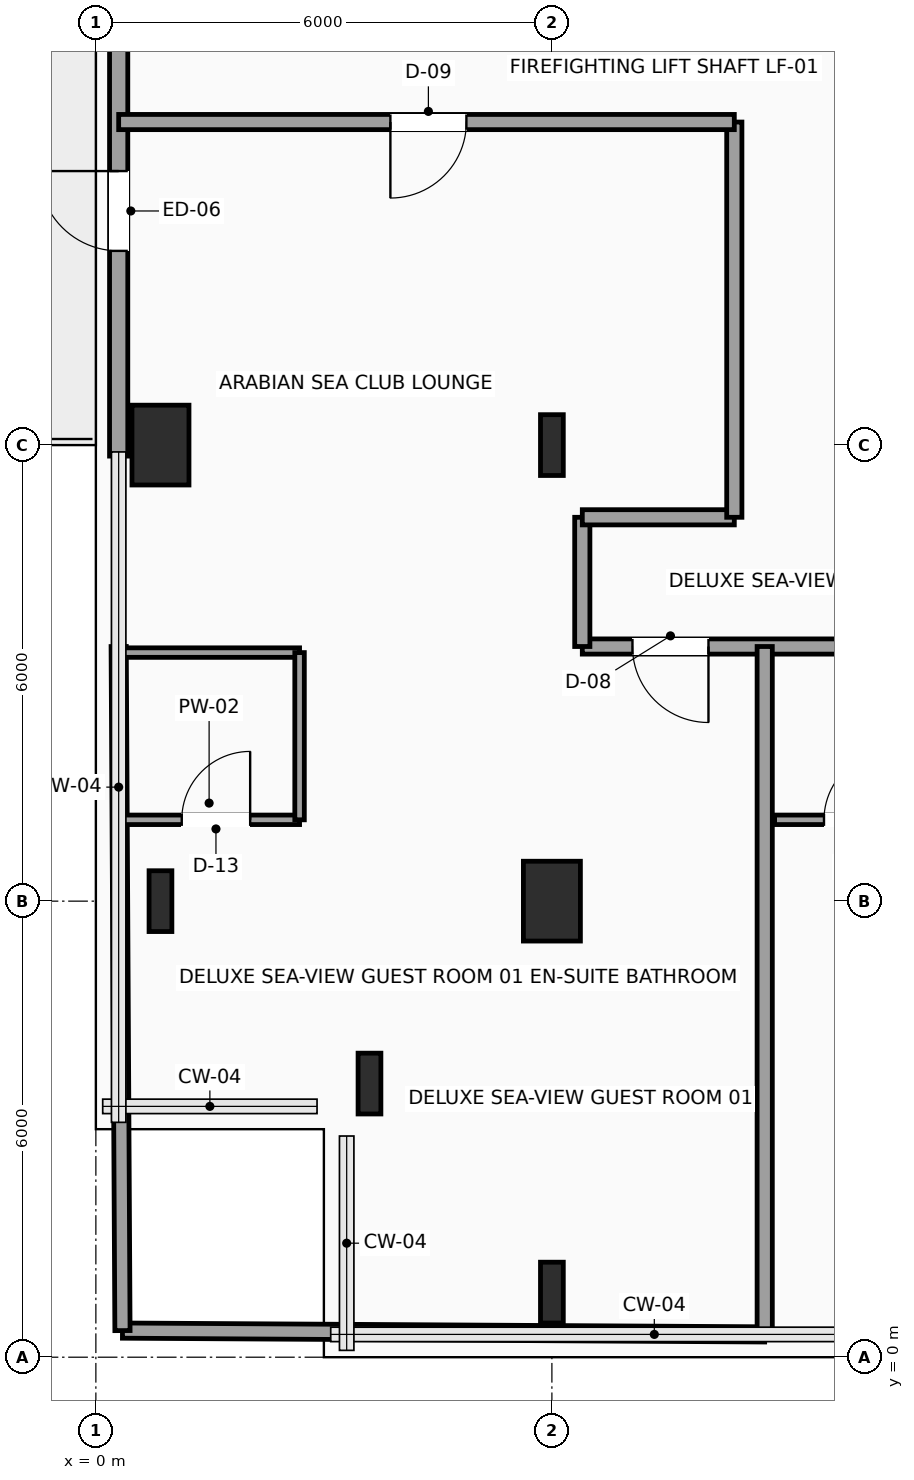
"""IFC4 building model, lengths in metres.
Left out: names, types, materials, properties, quantities, classifications, styles, units other than length and angle.
Written with IfcOpenShell. Run it as: python <this file> out.ifc"""

import sys

from ifc_helpers import new_model, si_unit, direction, frame, frame_2d, origin, origin_2d, place, context, subcontext, project, spatial, rectangle, i_section, extrude, element, fill, save


model = new_model("IFC4")
c1 = context("Model", 3, precision=1e-05, world=origin(), true_north=direction((0.0, 1.0)))
c2 = subcontext(c1, "Body", "Model", "MODEL_VIEW")
j1 = project(units=[si_unit("LENGTHUNIT", "METRE"), si_unit("PLANEANGLEUNIT", "RADIAN")], contexts=[c1])
p1 = place(None, origin())
s1 = spatial("IfcSite", under=j1, at=p1, CompositionType="ELEMENT")
p2 = place(p1, origin())
s2 = spatial("IfcBuilding", under=s1, at=p2, CompositionType="ELEMENT")
p3 = place(p2, frame((0.0, 0.0, 176.7)))
s3 = spatial("IfcBuildingStorey", under=s2, at=p3, CompositionType="ELEMENT", Elevation=176.7)
for number, where, z_axis, x_axis in (
    (1, (3.6, 3.6, 0.0), (0.0, 0.0, 1.0), (1.0, 0.0, 0.0)),
    (2, (0.85, 6.0, 0.0), (0.0, 0.0, 1.0), (1.0, 0.0, 0.0)),
):
    element("IfcColumn", number, at=place(p3, frame(where, z_axis=z_axis, x_axis=x_axis)), inside=s3, PredefinedType="COLUMN", context=c2, shape_type="SweptSolid", body=[
        extrude(i_section(OverallWidth=0.3, OverallDepth=0.8, WebThickness=0.018, FlangeThickness=0.033, FilletRadius=0.03, at=origin_2d()), origin(), (0.0, 0.0, 1.0), 3.75),
    ])
p4 = place(p3, frame((0.85, 12.0, 0.0), z_axis=(0.0, 0.0, 1.0), x_axis=(1.0, 0.0, 0.0)))
e3 = element("IfcColumn", 3, at=p4, inside=s3, PredefinedType="COLUMN", context=c2, shape_type="SweptSolid", body=[
    extrude(rectangle(XDim=0.75, YDim=1.05, at=origin_2d()), origin(), (0.0, 0.0, 1.0), 3.75),
])
p5 = place(p3, frame((6.0, 0.85, 0.0), z_axis=(0.0, 0.0, 1.0), x_axis=(1.0, 0.0, 0.0)))
e4 = element("IfcColumn", 4, at=p5, inside=s3, PredefinedType="COLUMN", context=c2, shape_type="SweptSolid", body=[
    extrude(i_section(OverallWidth=0.3, OverallDepth=0.8, WebThickness=0.018, FlangeThickness=0.033, FilletRadius=0.03, at=origin_2d()), origin(), (0.0, 0.0, 1.0), 3.75),
])
p6 = place(p3, frame((6.0, 6.0, 0.0), z_axis=(0.0, 0.0, 1.0), x_axis=(1.0, 0.0, 0.0)))
e5 = element("IfcColumn", 5, at=p6, inside=s3, PredefinedType="COLUMN", context=c2, shape_type="SweptSolid", body=[
    extrude(rectangle(XDim=0.75, YDim=1.05, at=origin_2d()), origin(), (0.0, 0.0, 1.0), 3.75),
])
p7 = place(p3, frame((6.0, 12.0, 0.0), z_axis=(0.0, 0.0, 1.0), x_axis=(1.0, 0.0, 0.0)))
e6 = element("IfcColumn", 6, at=p7, inside=s3, PredefinedType="COLUMN", context=c2, shape_type="SweptSolid", body=[
    extrude(i_section(OverallWidth=0.3, OverallDepth=0.8, WebThickness=0.018, FlangeThickness=0.033, FilletRadius=0.03, at=origin_2d()), origin(), (0.0, 0.0, 1.0), 3.75),
])
p8 = place(p3, frame((0.3, 11.855, 0.0), z_axis=(0.0, 0.0, 1.0), x_axis=(0.0, 1.0, 0.0)))
e7 = element("IfcWall", 7, at=p8, inside=s3, PredefinedType="SOLIDWALL", context=c2, shape_type="SweptSolid", body=[
    extrude(rectangle(XDim=9.29, YDim=0.24, at=frame_2d((4.645, 0.0))), origin(), (0.0, 0.0, 1.0), 3.54),
])
p9 = place(p8, frame((2.7, 0.0, 0.0)))
e8 = element("IfcOpeningElement", 8, at=p9, cuts=e7, PredefinedType="OPENING", context=c2, shape_type="SweptSolid", body=[
    extrude(rectangle(XDim=1.05, YDim=2.2, at=frame_2d((0.525, 1.1))), frame((0.0, 0.13, 0.0), z_axis=(0.0, -1.0, 0.0), x_axis=(1.0, 0.0, 0.0)), (0.0, 0.0, 1.0), 0.26),
])
p10 = place(p3, frame((22.25, 9.35, 0.0), z_axis=(0.0, 0.0, 1.0), x_axis=(-1.0, 0.0, 0.0)))
e9 = element("IfcWall", 9, at=p10, inside=s3, PredefinedType="PARTITIONING", context=c2, shape_type="SweptSolid", body=[
    extrude(rectangle(XDim=15.85, YDim=0.2, at=frame_2d((7.925, 0.0))), origin(), (0.0, 0.0, 1.0), 3.54),
])
p11 = place(p10, frame((14.19, 0.0, 0.0)))
e10 = element("IfcOpeningElement", 10, at=p11, cuts=e9, PredefinedType="OPENING", context=c2, shape_type="SweptSolid", body=[
    extrude(rectangle(XDim=1.0, YDim=2.2, at=frame_2d((0.5, 1.1))), frame((0.0, 0.11, 0.0), z_axis=(0.0, -1.0, 0.0), x_axis=(1.0, 0.0, 0.0)), (0.0, 0.0, 1.0), 0.22),
])
p12 = place(p10, frame((8.265, 0.0, 0.0)))
e11 = element("IfcOpeningElement", 11, at=p12, cuts=e9, PredefinedType="OPENING", context=c2, shape_type="SweptSolid", body=[
    extrude(rectangle(XDim=1.0, YDim=2.2, at=frame_2d((0.5, 1.1))), frame((0.0, 0.11, 0.0), z_axis=(0.0, -1.0, 0.0), x_axis=(1.0, 0.0, 0.0)), (0.0, 0.0, 1.0), 0.22),
])
p13 = place(p10, frame((1.54, 0.0, 0.0)))
e12 = element("IfcOpeningElement", 12, at=p13, cuts=e9, PredefinedType="OPENING", context=c2, shape_type="SweptSolid", body=[
    extrude(rectangle(XDim=1.0, YDim=2.2, at=frame_2d((0.5, 1.1))), frame((0.0, 0.11, 0.0), z_axis=(0.0, -1.0, 0.0), x_axis=(1.0, 0.0, 0.0)), (0.0, 0.0, 1.0), 0.22),
])
p14 = place(p3, frame((6.4, 9.35, 0.0), z_axis=(0.0, 0.0, 1.0), x_axis=(0.0, 1.0, 0.0)))
e13 = element("IfcWall", 13, at=p14, inside=s3, PredefinedType="PARTITIONING", context=c2, shape_type="SweptSolid", body=[
    extrude(rectangle(XDim=1.7, YDim=0.2, at=frame_2d((0.85, 0.0))), origin(), (0.0, 0.0, 1.0), 3.54),
])
p15 = place(p3, frame((6.4, 11.05, 0.0), z_axis=(0.0, 0.0, 1.0), x_axis=(1.0, 0.0, 0.0)))
e14 = element("IfcWall", 14, at=p15, inside=s3, PredefinedType="PARTITIONING", context=c2, shape_type="SweptSolid", body=[
    extrude(rectangle(XDim=2.0, YDim=0.2, at=frame_2d((1.0, 0.0))), origin(), (0.0, 0.0, 1.0), 3.54),
])
p16 = place(p3, frame((8.4, 11.05, 0.0), z_axis=(0.0, 0.0, 1.0), x_axis=(0.0, 1.0, 0.0)))
e15 = element("IfcWall", 15, at=p16, inside=s3, PredefinedType="PARTITIONING", context=c2, shape_type="SweptSolid", body=[
    extrude(rectangle(XDim=5.2, YDim=0.2, at=frame_2d((2.6, 0.0))), origin(), (0.0, 0.0, 1.0), 3.54),
])
p17 = place(p3, frame((8.4, 16.25, 0.0), z_axis=(0.0, 0.0, 1.0), x_axis=(-1.0, 0.0, 0.0)))
e16 = element("IfcWall", 16, at=p17, inside=s3, PredefinedType="PARTITIONING", context=c2, shape_type="SweptSolid", body=[
    extrude(rectangle(XDim=8.1, YDim=0.2, at=frame_2d((4.05, 0.0))), origin(), (0.0, 0.0, 1.0), 3.54),
])
p18 = place(p17, frame((3.525, 0.0, 0.0)))
e17 = element("IfcOpeningElement", 17, at=p18, cuts=e16, PredefinedType="OPENING", context=c2, shape_type="SweptSolid", body=[
    extrude(rectangle(XDim=1.0, YDim=2.2, at=frame_2d((0.5, 1.1))), frame((0.0, 0.11, 0.0), z_axis=(0.0, -1.0, 0.0), x_axis=(1.0, 0.0, 0.0)), (0.0, 0.0, 1.0), 0.22),
])
p19 = place(p3, frame((0.35, 0.35, 0.0), z_axis=(0.0, 0.0, 1.0), x_axis=(0.99998245966, -0.005922868574, 0.0)))
e18 = element("IfcWall", 18, at=p19, inside=s3, PredefinedType="PARTITIONING", context=c2, shape_type="SweptSolid", body=[
    extrude(rectangle(XDim=8.45, YDim=0.2, at=frame_2d((4.225, 0.0))), origin(), (0.0, 0.0, 1.0), 3.54),
])
p20 = place(p3, frame((0.35, 0.35, 0.0), z_axis=(0.0, 0.0, 1.0), x_axis=(-0.005560894919, 0.999984538104, 0.0)))
e19 = element("IfcWall", 19, at=p20, inside=s3, PredefinedType="PARTITIONING", context=c2, shape_type="SweptSolid", body=[
    extrude(rectangle(XDim=9.0, YDim=0.2, at=frame_2d((4.5, 0.0))), origin(), (0.0, 0.0, 1.0), 3.54),
])
p21 = place(p3, frame((8.8, 0.3, 0.0), z_axis=(0.0, 0.0, 1.0), x_axis=(0.0, 1.0, 0.0)))
e20 = element("IfcWall", 20, at=p21, inside=s3, PredefinedType="PARTITIONING", context=c2, shape_type="SweptSolid", body=[
    extrude(rectangle(XDim=9.05, YDim=0.2, at=frame_2d((4.525, 0.0))), origin(), (0.0, 0.0, 1.0), 3.54),
])
p22 = place(p3, frame((0.3, 7.07, 0.0), z_axis=(0.0, 0.0, 1.0), x_axis=(1.0, 0.0, 0.0)))
e21 = element("IfcWall", 21, at=p22, inside=s3, PredefinedType="PARTITIONING", context=c2, shape_type="SweptSolid", body=[
    extrude(rectangle(XDim=2.38, YDim=0.125, at=frame_2d((1.19, 0.0))), origin(), (0.0, 0.0, 1.0), 3.54),
])
p23 = place(p22, frame((0.83, 0.0, 0.0)))
e22 = element("IfcOpeningElement", 22, at=p23, cuts=e21, PredefinedType="OPENING", context=c2, shape_type="SweptSolid", body=[
    extrude(rectangle(XDim=0.9, YDim=2.1, at=frame_2d((0.45, 1.05))), frame((0.0, 0.073, 0.0), z_axis=(0.0, -1.0, 0.0), x_axis=(1.0, 0.0, 0.0)), (0.0, 0.0, 1.0), 0.145),
])
p24 = place(p3, frame((0.3, 9.27, 0.0), z_axis=(0.0, 0.0, 1.0), x_axis=(1.0, 0.0, 0.0)))
e23 = element("IfcWall", 23, at=p24, inside=s3, PredefinedType="PARTITIONING", context=c2, shape_type="SweptSolid", body=[
    extrude(rectangle(XDim=2.38, YDim=0.125, at=frame_2d((1.19, 0.0))), origin(), (0.0, 0.0, 1.0), 3.54),
])
p25 = place(p3, frame((2.68, 7.07, 0.0), z_axis=(0.0, 0.0, 1.0), x_axis=(0.0, 1.0, 0.0)))
e24 = element("IfcWall", 24, at=p25, inside=s3, PredefinedType="PARTITIONING", context=c2, shape_type="SweptSolid", body=[
    extrude(rectangle(XDim=2.2, YDim=0.125, at=frame_2d((1.1, 0.0))), origin(), (0.0, 0.0, 1.0), 3.54),
])
p26 = place(p3, frame((8.93, 7.07, 0.0), z_axis=(0.0, 0.0, 1.0), x_axis=(1.0, 0.0, 0.0)))
e25 = element("IfcWall", 25, at=p26, inside=s3, PredefinedType="PARTITIONING", context=c2, shape_type="SweptSolid", body=[
    extrude(rectangle(XDim=2.2, YDim=0.125, at=frame_2d((1.1, 0.0))), origin(), (0.0, 0.0, 1.0), 3.54),
])
p27 = place(p26, frame((0.65, 0.0, 0.0)))
e26 = element("IfcOpeningElement", 26, at=p27, cuts=e25, PredefinedType="OPENING", context=c2, shape_type="SweptSolid", body=[
    extrude(rectangle(XDim=0.9, YDim=2.1, at=frame_2d((0.45, 1.05))), frame((0.0, 0.073, 0.0), z_axis=(0.0, -1.0, 0.0), x_axis=(1.0, 0.0, 0.0)), (0.0, 0.0, 1.0), 0.145),
])
p28 = place(p9, origin())
e27 = element("IfcDoor", 27, at=p28, inside=s3, OperationType="SINGLE_SWING_RIGHT", PredefinedType="DOOR", context=c2, shape_type="SweptSolid", body=[
    extrude(rectangle(XDim=1.05, YDim=2.2, at=frame_2d((0.525, 1.1))), frame((0.0, 0.025, 0.0), z_axis=(0.0, -1.0, 0.0), x_axis=(1.0, 0.0, 0.0)), (0.0, 0.0, 1.0), 0.05),
])
fill(e8, e27)
p29 = place(p11, origin())
e28 = element("IfcDoor", 28, at=p29, inside=s3, OperationType="SINGLE_SWING_LEFT", PredefinedType="DOOR", context=c2, shape_type="SweptSolid", body=[
    extrude(rectangle(XDim=1.0, YDim=2.2, at=frame_2d((0.5, 1.1))), frame((0.0, 0.025, 0.0), z_axis=(0.0, -1.0, 0.0), x_axis=(1.0, 0.0, 0.0)), (0.0, 0.0, 1.0), 0.05),
])
fill(e10, e28)
p30 = place(p18, origin())
e29 = element("IfcDoor", 29, at=p30, inside=s3, OperationType="SINGLE_SWING_RIGHT", PredefinedType="DOOR", context=c2, shape_type="SweptSolid", body=[
    extrude(rectangle(XDim=1.0, YDim=2.2, at=frame_2d((0.5, 1.1))), frame((0.0, 0.025, 0.0), z_axis=(0.0, -1.0, 0.0), x_axis=(1.0, 0.0, 0.0)), (0.0, 0.0, 1.0), 0.05),
])
fill(e17, e29)
p31 = place(p23, origin())
e30 = element("IfcDoor", 30, at=p31, inside=s3, OperationType="SINGLE_SWING_RIGHT", PredefinedType="DOOR", context=c2, shape_type="SweptSolid", body=[
    extrude(rectangle(XDim=0.9, YDim=2.1, at=frame_2d((0.45, 1.05))), frame((0.0, 0.025, 0.0), z_axis=(0.0, -1.0, 0.0), x_axis=(1.0, 0.0, 0.0)), (0.0, 0.0, 1.0), 0.05),
])
fill(e22, e30)
p32 = place(p27, origin())
e31 = element("IfcDoor", 31, at=p32, inside=s3, OperationType="SINGLE_SWING_RIGHT", PredefinedType="DOOR", context=c2, shape_type="SweptSolid", body=[
    extrude(rectangle(XDim=0.9, YDim=2.1, at=frame_2d((0.45, 1.05))), frame((0.0, 0.025, 0.0), z_axis=(0.0, -1.0, 0.0), x_axis=(1.0, 0.0, 0.0)), (0.0, 0.0, 1.0), 0.05),
])
fill(e26, e31)
save(model, sys.argv[1])
